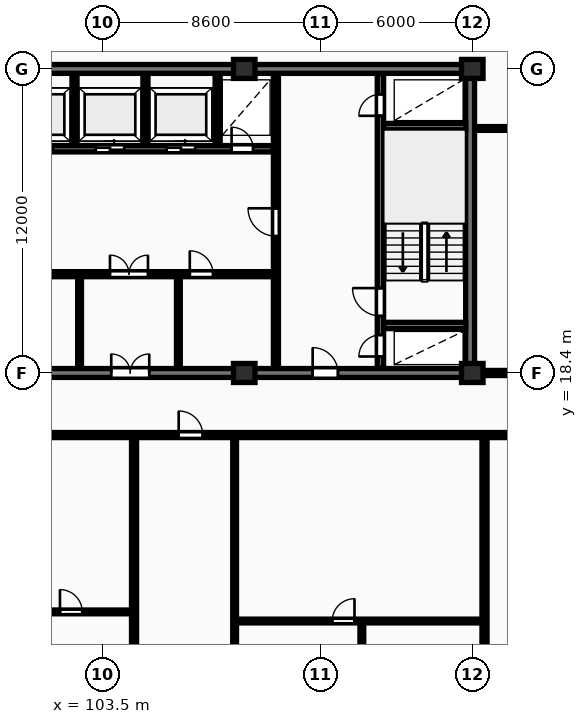
"""IFC4 building model, lengths in metres.
Left out: names, types, materials, properties, quantities, classifications, styles, units other than length and angle.
Written with IfcOpenShell. Run it as: python <this file> out.ifc"""

import sys

from ifc_helpers import new_model, si_unit, direction, frame, frame_2d, origin, origin_2d, place, context, subcontext, project, spatial, rectangle, extrude, element, fill, save


model = new_model("IFC4")
c1 = context("Model", 3, precision=1e-05, world=origin(), true_north=direction((0.0, 1.0)))
c2 = subcontext(c1, "Body", "Model", "MODEL_VIEW")
j1 = project(units=[si_unit("LENGTHUNIT", "METRE"), si_unit("PLANEANGLEUNIT", "RADIAN")], contexts=[c1])
p1 = place(None, origin())
s1 = spatial("IfcSite", under=j1, at=p1, CompositionType="ELEMENT")
p2 = place(p1, origin())
s2 = spatial("IfcBuilding", under=s1, at=p2, CompositionType="ELEMENT")
p3 = place(p2, frame((0.0, 0.0, 113.3)))
s3 = spatial("IfcBuildingStorey", under=s2, at=p3, CompositionType="ELEMENT", Elevation=113.3)
for number, where, z_axis, x_axis in (
    (1, (109.1, 18.4, 0.0), (0.0, 0.0, 1.0), (1.0, 0.0, 0.0)),
    (2, (109.1, 30.4, 0.0), (0.0, 0.0, 1.0), (1.0, 0.0, 0.0)),
    (3, (118.1, 18.4, 0.0), (0.0, 0.0, 1.0), (1.0, 0.0, 0.0)),
    (4, (118.1, 30.4, 0.0), (0.0, 0.0, 1.0), (1.0, 0.0, 0.0)),
):
    element("IfcColumn", number, at=place(p3, frame(where, z_axis=z_axis, x_axis=x_axis)), inside=s3, PredefinedType="COLUMN", context=c2, shape_type="SweptSolid", body=[
        extrude(rectangle(XDim=0.85, YDim=0.75, at=origin_2d()), origin(), (0.0, 0.0, 1.0), 3.25),
    ])
p4 = place(p3, frame((81.925, 30.4, 0.0), z_axis=(0.0, 0.0, 1.0), x_axis=(1.0, 0.0, 0.0)))
e5 = element("IfcWall", 5, at=p4, inside=s3, PredefinedType="SHEAR", context=c2, shape_type="SweptSolid", body=[
    extrude(rectangle(XDim=36.265, YDim=0.35, at=frame_2d((18.132, 0.0))), origin(), (0.0, 0.0, 1.0), 3.25),
])
p5 = place(p3, frame((118.015, 18.575, 0.0), z_axis=(0.0, 0.0, 1.0), x_axis=(0.0, 1.0, 0.0)))
e6 = element("IfcWall", 6, at=p5, inside=s3, PredefinedType="SHEAR", context=c2, shape_type="SweptSolid", body=[
    extrude(rectangle(XDim=11.65, YDim=0.35, at=frame_2d((5.825, 0.0))), origin(), (0.0, 0.0, 1.0), 3.25),
])
p6 = place(p3, frame((81.925, 18.4, 0.0), z_axis=(0.0, 0.0, 1.0), x_axis=(1.0, 0.0, 0.0)))
e7 = element("IfcWall", 7, at=p6, inside=s3, PredefinedType="SHEAR", context=c2, shape_type="SweptSolid", body=[
    extrude(rectangle(XDim=36.265, YDim=0.35, at=frame_2d((18.132, 0.0))), origin(), (0.0, 0.0, 1.0), 3.25),
])
p7 = place(p6, frame((5.675, 0.0, 0.0)))
e8 = element("IfcOpeningElement", 8, at=p7, cuts=e7, PredefinedType="OPENING", context=c2, shape_type="SweptSolid", body=[
    extrude(rectangle(XDim=1.0, YDim=2.15, at=frame_2d((0.5, 1.075))), frame((0.0, 0.185, 0.0), z_axis=(0.0, -1.0, 0.0), x_axis=(1.0, 0.0, 0.0)), (0.0, 0.0, 1.0), 0.37),
])
p8 = place(p6, frame((21.925, 0.0, 0.0)))
e9 = element("IfcOpeningElement", 9, at=p8, cuts=e7, PredefinedType="OPENING", context=c2, shape_type="SweptSolid", body=[
    extrude(rectangle(XDim=1.5, YDim=2.2, at=frame_2d((0.75, 1.1))), frame((0.0, 0.185, 0.0), z_axis=(0.0, -1.0, 0.0), x_axis=(1.0, 0.0, 0.0)), (0.0, 0.0, 1.0), 0.37),
])
p9 = place(p6, frame((29.875, 0.0, 0.0)))
e10 = element("IfcOpeningElement", 10, at=p9, cuts=e7, PredefinedType="OPENING", context=c2, shape_type="SweptSolid", body=[
    extrude(rectangle(XDim=1.0, YDim=2.15, at=frame_2d((0.5, 1.075))), frame((0.0, 0.185, 0.0), z_axis=(0.0, -1.0, 0.0), x_axis=(1.0, 0.0, 0.0)), (0.0, 0.0, 1.0), 0.37),
])
for number, where, z_axis, x_axis in (
    (11, (102.4, 27.38, 0.0), (0.0, 0.0, 1.0), (0.0, 1.0, 0.0)),
    (12, (105.2, 27.38, 0.0), (0.0, 0.0, 1.0), (0.0, 1.0, 0.0)),
    (13, (108.05, 27.38, 0.0), (0.0, 0.0, 1.0), (0.0, 1.0, 0.0)),
):
    element("IfcWall", number, at=place(p3, frame(where, z_axis=z_axis, x_axis=x_axis)), inside=s3, PredefinedType="PARTITIONING", context=c2, shape_type="SweptSolid", body=[
        extrude(rectangle(XDim=2.82, YDim=0.2, at=frame_2d((1.41, 0.0))), origin(), (0.0, 0.0, 1.0), 2.97),
    ])
p10 = place(p3, frame((99.68, 27.25, 0.0), z_axis=(0.0, 0.0, 1.0), x_axis=(1.0, 0.0, 0.0)))
e14 = element("IfcWall", 14, at=p10, inside=s3, PredefinedType="SHEAR", context=c2, shape_type="SweptSolid", body=[
    extrude(rectangle(XDim=10.54, YDim=0.25, at=frame_2d((5.27, 0.0))), origin(), (0.0, 0.0, 1.0), 3.25),
])
p11 = place(p10, frame((0.76, 0.0, 0.0)))
e15 = element("IfcOpeningElement", 15, at=p11, cuts=e14, PredefinedType="OPENING", context=c2, shape_type="SweptSolid", body=[
    extrude(rectangle(XDim=1.12, YDim=2.12, at=frame_2d((0.56, 1.06))), frame((0.0, 0.135, 0.0), z_axis=(0.0, -1.0, 0.0), x_axis=(1.0, 0.0, 0.0)), (0.0, 0.0, 1.0), 0.27),
])
p12 = place(p10, frame((3.56, 0.0, 0.0)))
e16 = element("IfcOpeningElement", 16, at=p12, cuts=e14, PredefinedType="OPENING", context=c2, shape_type="SweptSolid", body=[
    extrude(rectangle(XDim=1.12, YDim=2.12, at=frame_2d((0.56, 1.06))), frame((0.0, 0.135, 0.0), z_axis=(0.0, -1.0, 0.0), x_axis=(1.0, 0.0, 0.0)), (0.0, 0.0, 1.0), 0.27),
])
p13 = place(p10, frame((6.36, 0.0, 0.0)))
e17 = element("IfcOpeningElement", 17, at=p13, cuts=e14, PredefinedType="OPENING", context=c2, shape_type="SweptSolid", body=[
    extrude(rectangle(XDim=1.12, YDim=2.12, at=frame_2d((0.56, 1.06))), frame((0.0, 0.135, 0.0), z_axis=(0.0, -1.0, 0.0), x_axis=(1.0, 0.0, 0.0)), (0.0, 0.0, 1.0), 0.27),
])
p14 = place(p10, frame((8.92, 0.0, 0.0)))
e18 = element("IfcOpeningElement", 18, at=p14, cuts=e14, PredefinedType="OPENING", context=c2, shape_type="SweptSolid", body=[
    extrude(rectangle(XDim=0.85, YDim=2.05, at=frame_2d((0.425, 1.025))), frame((0.0, 0.135, 0.0), z_axis=(0.0, -1.0, 0.0), x_axis=(1.0, 0.0, 0.0)), (0.0, 0.0, 1.0), 0.27),
])
for number, where, z_axis, x_axis in (
    (19, (102.6, 18.6, 0.0), (0.0, 0.0, 1.0), (0.0, 1.0, 0.0)),
    (20, (106.5, 18.6, 0.0), (0.0, 0.0, 1.0), (0.0, 1.0, 0.0)),
):
    element("IfcWall", number, at=place(p3, frame(where, z_axis=z_axis, x_axis=x_axis)), inside=s3, PredefinedType="PARTITIONING", context=c2, shape_type="SweptSolid", body=[
        extrude(rectangle(XDim=3.6, YDim=0.15, at=frame_2d((1.8, 0.0))), origin(), (0.0, 0.0, 1.0), 2.97),
    ])
p15 = place(p3, frame((91.08, 22.3, 0.0), z_axis=(0.0, 0.0, 1.0), x_axis=(1.0, 0.0, 0.0)))
e21 = element("IfcWall", 21, at=p15, inside=s3, PredefinedType="PARTITIONING", context=c2, shape_type="SweptSolid", body=[
    extrude(rectangle(XDim=19.14, YDim=0.2, at=frame_2d((9.57, 0.0))), origin(), (0.0, 0.0, 1.0), 2.97),
])
p16 = place(p15, frame((1.15, 0.0, 0.0)))
e22 = element("IfcOpeningElement", 22, at=p16, cuts=e21, PredefinedType="OPENING", context=c2, shape_type="SweptSolid", body=[
    extrude(rectangle(XDim=0.85, YDim=2.05, at=frame_2d((0.425, 1.025))), frame((0.0, 0.11, 0.0), z_axis=(0.0, -1.0, 0.0), x_axis=(1.0, 0.0, 0.0)), (0.0, 0.0, 1.0), 0.22),
])
p17 = place(p15, frame((3.2, 0.0, 0.0)))
e23 = element("IfcOpeningElement", 23, at=p17, cuts=e21, PredefinedType="OPENING", context=c2, shape_type="SweptSolid", body=[
    extrude(rectangle(XDim=0.85, YDim=2.05, at=frame_2d((0.425, 1.025))), frame((0.0, 0.11, 0.0), z_axis=(0.0, -1.0, 0.0), x_axis=(1.0, 0.0, 0.0)), (0.0, 0.0, 1.0), 0.22),
])
p18 = place(p15, frame((12.72, 0.0, 0.0)))
e24 = element("IfcOpeningElement", 24, at=p18, cuts=e21, PredefinedType="OPENING", context=c2, shape_type="SweptSolid", body=[
    extrude(rectangle(XDim=1.5, YDim=2.2, at=frame_2d((0.75, 1.1))), frame((0.0, 0.11, 0.0), z_axis=(0.0, -1.0, 0.0), x_axis=(1.0, 0.0, 0.0)), (0.0, 0.0, 1.0), 0.22),
])
p19 = place(p15, frame((6.42, 0.0, 0.0)))
e25 = element("IfcOpeningElement", 25, at=p19, cuts=e21, PredefinedType="OPENING", context=c2, shape_type="SweptSolid", body=[
    extrude(rectangle(XDim=0.92, YDim=2.08, at=frame_2d((0.46, 1.04))), frame((0.0, 0.11, 0.0), z_axis=(0.0, -1.0, 0.0), x_axis=(1.0, 0.0, 0.0)), (0.0, 0.0, 1.0), 0.22),
])
p20 = place(p15, frame((15.87, 0.0, 0.0)))
e26 = element("IfcOpeningElement", 26, at=p20, cuts=e21, PredefinedType="OPENING", context=c2, shape_type="SweptSolid", body=[
    extrude(rectangle(XDim=0.92, YDim=2.08, at=frame_2d((0.46, 1.04))), frame((0.0, 0.11, 0.0), z_axis=(0.0, -1.0, 0.0), x_axis=(1.0, 0.0, 0.0)), (0.0, 0.0, 1.0), 0.22),
])
p21 = place(p3, frame((110.35, 18.6, 0.0), z_axis=(0.0, 0.0, 1.0), x_axis=(0.0, 1.0, 0.0)))
e27 = element("IfcWall", 27, at=p21, inside=s3, PredefinedType="PARTITIONING", context=c2, shape_type="SweptSolid", body=[
    extrude(rectangle(XDim=11.6, YDim=0.2, at=frame_2d((5.8, 0.0))), origin(), (0.0, 0.0, 1.0), 2.97),
])
p22 = place(p21, frame((5.2, 0.0, 0.0)))
e28 = element("IfcOpeningElement", 28, at=p22, cuts=e27, PredefinedType="OPENING", context=c2, shape_type="SweptSolid", body=[
    extrude(rectangle(XDim=1.1, YDim=2.15, at=frame_2d((0.55, 1.075))), frame((0.0, 0.11, 0.0), z_axis=(0.0, -1.0, 0.0), x_axis=(1.0, 0.0, 0.0)), (0.0, 0.0, 1.0), 0.22),
])
p23 = place(p3, frame((114.475, 18.6, 0.0), z_axis=(0.0, 0.0, 1.0), x_axis=(0.0, 1.0, 0.0)))
e29 = element("IfcWall", 29, at=p23, inside=s3, PredefinedType="SHEAR", context=c2, shape_type="SweptSolid", body=[
    extrude(rectangle(XDim=11.6, YDim=0.25, at=frame_2d((5.8, 0.0))), origin(), (0.0, 0.0, 1.0), 3.25),
])
p24 = place(p23, frame((0.45, 0.0, 0.0)))
e30 = element("IfcOpeningElement", 30, at=p24, cuts=e29, PredefinedType="OPENING", context=c2, shape_type="SweptSolid", body=[
    extrude(rectangle(XDim=0.85, YDim=2.05, at=frame_2d((0.425, 1.025))), frame((0.0, 0.135, 0.0), z_axis=(0.0, -1.0, 0.0), x_axis=(1.0, 0.0, 0.0)), (0.0, 0.0, 1.0), 0.27),
])
p25 = place(p23, frame((2.05, 0.0, 0.0)))
e31 = element("IfcOpeningElement", 31, at=p25, cuts=e29, PredefinedType="OPENING", context=c2, shape_type="SweptSolid", body=[
    extrude(rectangle(XDim=1.1, YDim=2.1, at=frame_2d((0.55, 1.05))), frame((0.0, 0.135, 0.0), z_axis=(0.0, -1.0, 0.0), x_axis=(1.0, 0.0, 0.0)), (0.0, 0.0, 1.0), 0.27),
])
p26 = place(p23, frame((9.95, 0.0, 0.0)))
e32 = element("IfcOpeningElement", 32, at=p26, cuts=e29, PredefinedType="OPENING", context=c2, shape_type="SweptSolid", body=[
    extrude(rectangle(XDim=0.85, YDim=2.05, at=frame_2d((0.425, 1.025))), frame((0.0, 0.135, 0.0), z_axis=(0.0, -1.0, 0.0), x_axis=(1.0, 0.0, 0.0)), (0.0, 0.0, 1.0), 0.27),
])
for number, where, z_axis, x_axis in (
    (33, (114.6, 20.275, 0.0), (0.0, 0.0, 1.0), (1.0, 0.0, 0.0)),
    (34, (114.6, 28.125, 0.0), (0.0, 0.0, 1.0), (1.0, 0.0, 0.0)),
):
    element("IfcWall", number, at=place(p3, frame(where, z_axis=z_axis, x_axis=x_axis)), inside=s3, PredefinedType="SHEAR", context=c2, shape_type="SweptSolid", body=[
        extrude(rectangle(XDim=3.24, YDim=0.25, at=frame_2d((1.62, 0.0))), origin(), (0.0, 0.0, 1.0), 3.25),
    ])
p27 = place(p3, frame((118.27, 28.05, 0.0), z_axis=(0.0, 0.0, 1.0), x_axis=(1.0, 0.0, 0.0)))
e35 = element("IfcWall", 35, at=p27, inside=s3, PredefinedType="PARTITIONING", context=c2, shape_type="SweptSolid", body=[
    extrude(rectangle(XDim=6.76, YDim=0.15, at=frame_2d((3.38, 0.0))), origin(), (0.0, 0.0, 1.0), 2.97),
])
p28 = place(p27, frame((1.587, 0.0, 0.0)))
e36 = element("IfcOpeningElement", 36, at=p28, cuts=e35, PredefinedType="OPENING", context=c2, shape_type="SweptSolid", body=[
    extrude(rectangle(XDim=0.84, YDim=2.04, at=frame_2d((0.42, 1.02))), frame((0.0, 0.085, 0.0), z_axis=(0.0, -1.0, 0.0), x_axis=(1.0, 0.0, 0.0)), (0.0, 0.0, 1.0), 0.17),
])
p29 = place(p27, frame((2.94, 0.0, 0.0)))
e37 = element("IfcOpeningElement", 37, at=p29, cuts=e35, PredefinedType="OPENING", context=c2, shape_type="SweptSolid", body=[
    extrude(rectangle(XDim=0.88, YDim=2.06, at=frame_2d((0.44, 1.03))), frame((0.0, 0.085, 0.0), z_axis=(0.0, -1.0, 0.0), x_axis=(1.0, 0.0, 0.0)), (0.0, 0.0, 1.0), 0.17),
])
p30 = place(p3, frame((118.25, 18.4, 0.0), z_axis=(0.0, 0.0, 1.0), x_axis=(1.0, 0.0, 0.0)))
e38 = element("IfcWall", 38, at=p30, inside=s3, PredefinedType="PARTITIONING", context=c2, shape_type="SweptSolid", body=[
    extrude(rectangle(XDim=12.45, YDim=0.2, at=frame_2d((6.225, 0.0))), origin(), (0.0, 0.0, 1.0), 2.358),
])
p31 = place(p30, frame((1.51, 0.0, 0.0)))
e39 = element("IfcOpeningElement", 39, at=p31, cuts=e38, PredefinedType="OPENING", context=c2, shape_type="SweptSolid", body=[
    extrude(rectangle(XDim=0.95, YDim=2.15, at=frame_2d((0.475, 1.075))), frame((0.0, 0.11, 0.0), z_axis=(0.0, -1.0, 0.0), x_axis=(1.0, 0.0, 0.0)), (0.0, 0.0, 1.0), 0.22),
])
p32 = place(p3, frame((104.75, -8.7, 0.0), z_axis=(0.0, 0.0, 1.0), x_axis=(0.0, 1.0, 0.0)))
e40 = element("IfcWall", 40, at=p32, inside=s3, PredefinedType="PARTITIONING", context=c2, shape_type="SweptSolid", body=[
    extrude(rectangle(XDim=24.57, YDim=0.2, at=frame_2d((12.285, 0.0))), origin(), (0.0, 0.0, 1.0), 2.97),
])
p33 = place(p3, frame((96.363, 8.97, 0.0), z_axis=(0.0, 0.0, 1.0), x_axis=(1.0, 0.0, 0.0)))
e41 = element("IfcWall", 41, at=p33, inside=s3, PredefinedType="PARTITIONING", context=c2, shape_type="SweptSolid", body=[
    extrude(rectangle(XDim=8.307, YDim=0.15, at=frame_2d((4.153, 0.0))), origin(), (0.0, 0.0, 1.0), 2.97),
])
p34 = place(p33, frame((5.462, 0.0, 0.0)))
e42 = element("IfcOpeningElement", 42, at=p34, cuts=e41, PredefinedType="OPENING", context=c2, shape_type="SweptSolid", body=[
    extrude(rectangle(XDim=0.88, YDim=2.06, at=frame_2d((0.44, 1.03))), frame((0.0, 0.085, 0.0), z_axis=(0.0, -1.0, 0.0), x_axis=(1.0, 0.0, 0.0)), (0.0, 0.0, 1.0), 0.17),
])
p35 = place(p3, frame((118.583, -8.7, 0.0), z_axis=(0.0, 0.0, 1.0), x_axis=(0.0, 1.0, 0.0)))
e43 = element("IfcWall", 43, at=p35, inside=s3, PredefinedType="PARTITIONING", context=c2, shape_type="SweptSolid", body=[
    extrude(rectangle(XDim=24.57, YDim=0.2, at=frame_2d((12.285, 0.0))), origin(), (0.0, 0.0, 1.0), 2.97),
])
p36 = place(p3, frame((113.742, 1.69, 0.0), z_axis=(0.0, 0.0, 1.0), x_axis=(0.0, 1.0, 0.0)))
e44 = element("IfcWall", 44, at=p36, inside=s3, PredefinedType="PARTITIONING", context=c2, shape_type="SweptSolid", body=[
    extrude(rectangle(XDim=6.92, YDim=0.15, at=frame_2d((3.46, 0.0))), origin(), (0.0, 0.0, 1.0), 2.97),
])
p37 = place(p36, frame((3.04, 0.0, 0.0)))
e45 = element("IfcOpeningElement", 45, at=p37, cuts=e44, PredefinedType="OPENING", context=c2, shape_type="SweptSolid", body=[
    extrude(rectangle(XDim=0.84, YDim=2.04, at=frame_2d((0.42, 1.02))), frame((0.0, 0.085, 0.0), z_axis=(0.0, -1.0, 0.0), x_axis=(1.0, 0.0, 0.0)), (0.0, 0.0, 1.0), 0.17),
])
p38 = place(p3, frame((108.78, 8.61, 0.0), z_axis=(0.0, 0.0, 1.0), x_axis=(1.0, 0.0, 0.0)))
e46 = element("IfcWall", 46, at=p38, inside=s3, PredefinedType="PARTITIONING", context=c2, shape_type="SweptSolid", body=[
    extrude(rectangle(XDim=9.723, YDim=0.15, at=frame_2d((4.862, 0.0))), origin(), (0.0, 0.0, 1.0), 2.97),
])
p39 = place(p38, frame((3.792, 0.0, 0.0)))
e47 = element("IfcOpeningElement", 47, at=p39, cuts=e46, PredefinedType="OPENING", context=c2, shape_type="SweptSolid", body=[
    extrude(rectangle(XDim=0.88, YDim=2.06, at=frame_2d((0.44, 1.03))), frame((0.0, 0.085, 0.0), z_axis=(0.0, -1.0, 0.0), x_axis=(1.0, 0.0, 0.0)), (0.0, 0.0, 1.0), 0.17),
])
p40 = place(p3, frame((108.72, 1.69, 0.0), z_axis=(0.0, 0.0, 1.0), x_axis=(0.0, 1.0, 0.0)))
e48 = element("IfcWall", 48, at=p40, inside=s3, PredefinedType="PARTITIONING", context=c2, shape_type="SweptSolid", body=[
    extrude(rectangle(XDim=14.2, YDim=0.15, at=frame_2d((7.1, 0.0))), origin(), (0.0, 0.0, 1.0), 2.97),
])
p41 = place(p40, frame((2.526, 0.0, 0.0)))
e49 = element("IfcOpeningElement", 49, at=p41, cuts=e48, PredefinedType="OPENING", context=c2, shape_type="SweptSolid", body=[
    extrude(rectangle(XDim=0.88, YDim=2.06, at=frame_2d((0.44, 1.03))), frame((0.0, 0.085, 0.0), z_axis=(0.0, -1.0, 0.0), x_axis=(1.0, 0.0, 0.0)), (0.0, 0.0, 1.0), 0.17),
])
p42 = place(p3, frame((72.7, 15.95, 0.0), z_axis=(0.0, 0.0, 1.0), x_axis=(1.0, 0.0, 0.0)))
e50 = element("IfcWall", 50, at=p42, inside=s3, PredefinedType="PARTITIONING", context=c2, shape_type="SweptSolid", body=[
    extrude(rectangle(XDim=58.0, YDim=0.2, at=frame_2d((29.0, 0.0))), origin(), (0.0, 0.0, 1.0), 2.97),
])
p43 = place(p42, frame((6.373, 0.0, 0.0)))
e51 = element("IfcOpeningElement", 51, at=p43, cuts=e50, PredefinedType="OPENING", context=c2, shape_type="SweptSolid", body=[
    extrude(rectangle(XDim=1.22, YDim=2.18, at=frame_2d((0.61, 1.09))), frame((0.0, 0.11, 0.0), z_axis=(0.0, -1.0, 0.0), x_axis=(1.0, 0.0, 0.0)), (0.0, 0.0, 1.0), 0.22),
])
p44 = place(p42, frame((21.678, 0.0, 0.0)))
e52 = element("IfcOpeningElement", 52, at=p44, cuts=e50, PredefinedType="OPENING", context=c2, shape_type="SweptSolid", body=[
    extrude(rectangle(XDim=0.95, YDim=2.15, at=frame_2d((0.475, 1.075))), frame((0.0, 0.11, 0.0), z_axis=(0.0, -1.0, 0.0), x_axis=(1.0, 0.0, 0.0)), (0.0, 0.0, 1.0), 0.22),
])
p45 = place(p42, frame((33.812, 0.0, 0.0)))
e53 = element("IfcOpeningElement", 53, at=p45, cuts=e50, PredefinedType="OPENING", context=c2, shape_type="SweptSolid", body=[
    extrude(rectangle(XDim=0.95, YDim=2.15, at=frame_2d((0.475, 1.075))), frame((0.0, 0.11, 0.0), z_axis=(0.0, -1.0, 0.0), x_axis=(1.0, 0.0, 0.0)), (0.0, 0.0, 1.0), 0.22),
])
p46 = place(p42, frame((47.928, 0.0, 0.0)))
e54 = element("IfcOpeningElement", 54, at=p46, cuts=e50, PredefinedType="OPENING", context=c2, shape_type="SweptSolid", body=[
    extrude(rectangle(XDim=0.95, YDim=2.15, at=frame_2d((0.475, 1.075))), frame((0.0, 0.11, 0.0), z_axis=(0.0, -1.0, 0.0), x_axis=(1.0, 0.0, 0.0)), (0.0, 0.0, 1.0), 0.22),
])
p47 = place(p8, origin())
e55 = element("IfcDoor", 55, at=p47, inside=s3, OperationType="DOUBLE_DOOR_SINGLE_SWING", PredefinedType="DOOR", context=c2, shape_type="SweptSolid", body=[
    extrude(rectangle(XDim=1.5, YDim=2.2, at=frame_2d((0.75, 1.1))), frame((0.0, 0.025, 0.0), z_axis=(0.0, -1.0, 0.0), x_axis=(1.0, 0.0, 0.0)), (0.0, 0.0, 1.0), 0.05),
])
fill(e9, e55)
p48 = place(p9, origin())
e56 = element("IfcDoor", 56, at=p48, inside=s3, OperationType="SINGLE_SWING_LEFT", PredefinedType="DOOR", context=c2, shape_type="SweptSolid", body=[
    extrude(rectangle(XDim=1.0, YDim=2.15, at=frame_2d((0.5, 1.075))), frame((0.0, 0.025, 0.0), z_axis=(0.0, -1.0, 0.0), x_axis=(1.0, 0.0, 0.0)), (0.0, 0.0, 1.0), 0.05),
])
fill(e10, e56)
p49 = place(p11, origin())
e57 = element("IfcDoor", 57, at=p49, inside=s3, OperationType="SLIDING_TO_RIGHT", PredefinedType="DOOR", context=c2, shape_type="SweptSolid", body=[
    extrude(rectangle(XDim=1.12, YDim=2.12, at=frame_2d((0.56, 1.06))), frame((0.0, 0.025, 0.0), z_axis=(0.0, -1.0, 0.0), x_axis=(1.0, 0.0, 0.0)), (0.0, 0.0, 1.0), 0.05),
])
fill(e15, e57)
p50 = place(p12, origin())
e58 = element("IfcDoor", 58, at=p50, inside=s3, OperationType="SLIDING_TO_RIGHT", PredefinedType="DOOR", context=c2, shape_type="SweptSolid", body=[
    extrude(rectangle(XDim=1.12, YDim=2.12, at=frame_2d((0.56, 1.06))), frame((0.0, 0.025, 0.0), z_axis=(0.0, -1.0, 0.0), x_axis=(1.0, 0.0, 0.0)), (0.0, 0.0, 1.0), 0.05),
])
fill(e16, e58)
p51 = place(p13, origin())
e59 = element("IfcDoor", 59, at=p51, inside=s3, OperationType="SLIDING_TO_RIGHT", PredefinedType="DOOR", context=c2, shape_type="SweptSolid", body=[
    extrude(rectangle(XDim=1.12, YDim=2.12, at=frame_2d((0.56, 1.06))), frame((0.0, 0.025, 0.0), z_axis=(0.0, -1.0, 0.0), x_axis=(1.0, 0.0, 0.0)), (0.0, 0.0, 1.0), 0.05),
])
fill(e17, e59)
p52 = place(p14, origin())
e60 = element("IfcDoor", 60, at=p52, inside=s3, OperationType="SINGLE_SWING_LEFT", PredefinedType="DOOR", context=c2, shape_type="SweptSolid", body=[
    extrude(rectangle(XDim=0.85, YDim=2.05, at=frame_2d((0.425, 1.025))), frame((0.0, 0.025, 0.0), z_axis=(0.0, -1.0, 0.0), x_axis=(1.0, 0.0, 0.0)), (0.0, 0.0, 1.0), 0.05),
])
fill(e18, e60)
p53 = place(p18, origin())
e61 = element("IfcDoor", 61, at=p53, inside=s3, OperationType="DOUBLE_DOOR_SINGLE_SWING", PredefinedType="DOOR", context=c2, shape_type="SweptSolid", body=[
    extrude(rectangle(XDim=1.5, YDim=2.2, at=frame_2d((0.75, 1.1))), frame((0.0, 0.025, 0.0), z_axis=(0.0, -1.0, 0.0), x_axis=(1.0, 0.0, 0.0)), (0.0, 0.0, 1.0), 0.05),
])
fill(e24, e61)
p54 = place(p20, origin())
e62 = element("IfcDoor", 62, at=p54, inside=s3, OperationType="SINGLE_SWING_LEFT", PredefinedType="DOOR", context=c2, shape_type="SweptSolid", body=[
    extrude(rectangle(XDim=0.92, YDim=2.08, at=frame_2d((0.46, 1.04))), frame((0.0, 0.025, 0.0), z_axis=(0.0, -1.0, 0.0), x_axis=(1.0, 0.0, 0.0)), (0.0, 0.0, 1.0), 0.05),
])
fill(e26, e62)
p55 = place(p22, origin())
e63 = element("IfcDoor", 63, at=p55, inside=s3, OperationType="SINGLE_SWING_RIGHT", PredefinedType="DOOR", context=c2, shape_type="SweptSolid", body=[
    extrude(rectangle(XDim=1.1, YDim=2.15, at=frame_2d((0.55, 1.075))), frame((0.0, 0.025, 0.0), z_axis=(0.0, -1.0, 0.0), x_axis=(1.0, 0.0, 0.0)), (0.0, 0.0, 1.0), 0.05),
])
fill(e28, e63)
p56 = place(p24, origin())
e64 = element("IfcDoor", 64, at=p56, inside=s3, OperationType="SINGLE_SWING_LEFT", PredefinedType="DOOR", context=c2, shape_type="SweptSolid", body=[
    extrude(rectangle(XDim=0.85, YDim=2.05, at=frame_2d((0.425, 1.025))), frame((0.0, 0.025, 0.0), z_axis=(0.0, -1.0, 0.0), x_axis=(1.0, 0.0, 0.0)), (0.0, 0.0, 1.0), 0.05),
])
fill(e30, e64)
p57 = place(p25, origin())
e65 = element("IfcDoor", 65, at=p57, inside=s3, OperationType="SINGLE_SWING_RIGHT", PredefinedType="DOOR", context=c2, shape_type="SweptSolid", body=[
    extrude(rectangle(XDim=1.1, YDim=2.1, at=frame_2d((0.55, 1.05))), frame((0.0, 0.025, 0.0), z_axis=(0.0, -1.0, 0.0), x_axis=(1.0, 0.0, 0.0)), (0.0, 0.0, 1.0), 0.05),
])
fill(e31, e65)
p58 = place(p26, origin())
e66 = element("IfcDoor", 66, at=p58, inside=s3, OperationType="SINGLE_SWING_LEFT", PredefinedType="DOOR", context=c2, shape_type="SweptSolid", body=[
    extrude(rectangle(XDim=0.85, YDim=2.05, at=frame_2d((0.425, 1.025))), frame((0.0, 0.025, 0.0), z_axis=(0.0, -1.0, 0.0), x_axis=(1.0, 0.0, 0.0)), (0.0, 0.0, 1.0), 0.05),
])
fill(e32, e66)
p59 = place(p34, origin())
e67 = element("IfcDoor", 67, at=p59, inside=s3, OperationType="SINGLE_SWING_LEFT", PredefinedType="DOOR", context=c2, shape_type="SweptSolid", body=[
    extrude(rectangle(XDim=0.88, YDim=2.06, at=frame_2d((0.44, 1.03))), frame((0.0, 0.025, 0.0), z_axis=(0.0, -1.0, 0.0), x_axis=(1.0, 0.0, 0.0)), (0.0, 0.0, 1.0), 0.05),
])
fill(e42, e67)
p60 = place(p39, origin())
e68 = element("IfcDoor", 68, at=p60, inside=s3, OperationType="SINGLE_SWING_RIGHT", PredefinedType="DOOR", context=c2, shape_type="SweptSolid", body=[
    extrude(rectangle(XDim=0.88, YDim=2.06, at=frame_2d((0.44, 1.03))), frame((0.0, 0.025, 0.0), z_axis=(0.0, -1.0, 0.0), x_axis=(1.0, 0.0, 0.0)), (0.0, 0.0, 1.0), 0.05),
])
fill(e47, e68)
p61 = place(p45, origin())
e69 = element("IfcDoor", 69, at=p61, inside=s3, OperationType="SINGLE_SWING_LEFT", PredefinedType="DOOR", context=c2, shape_type="SweptSolid", body=[
    extrude(rectangle(XDim=0.95, YDim=2.15, at=frame_2d((0.475, 1.075))), frame((0.0, 0.025, 0.0), z_axis=(0.0, -1.0, 0.0), x_axis=(1.0, 0.0, 0.0)), (0.0, 0.0, 1.0), 0.05),
])
fill(e53, e69)
save(model, sys.argv[1])
